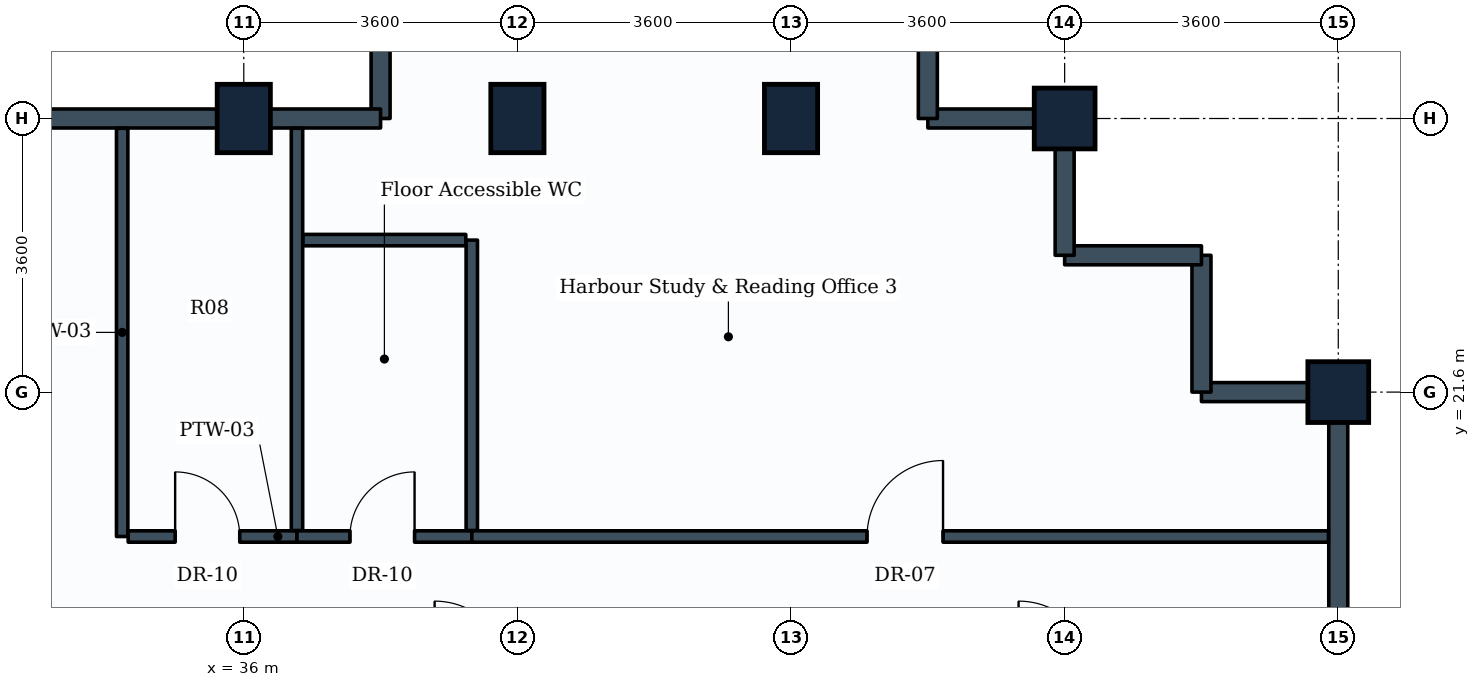
"""IFC4 building model, lengths in metres.
Left out: names, types, materials, properties, quantities, classifications, styles, units other than length and angle.
Written with IfcOpenShell. Run it as: python <this file> out.ifc"""

import sys

from ifc_helpers import new_model, si_unit, direction, frame, frame_2d, origin, origin_2d, place, context, subcontext, project, spatial, rectangle, extrude, element, fill, save


model = new_model("IFC4")
c1 = context("Model", 3, precision=1e-05, world=origin(), true_north=direction((0.0, 1.0)))
c2 = subcontext(c1, "Body", "Model", "MODEL_VIEW")
j1 = project(units=[si_unit("LENGTHUNIT", "METRE"), si_unit("PLANEANGLEUNIT", "RADIAN")], contexts=[c1])
p1 = place(None, origin())
s1 = spatial("IfcSite", under=j1, at=p1, CompositionType="ELEMENT")
p2 = place(p1, origin())
s2 = spatial("IfcBuilding", under=s1, at=p2, CompositionType="ELEMENT")
p3 = place(p2, frame((0.0, 0.0, 217.4)))
s3 = spatial("IfcBuildingStorey", under=s2, at=p3, CompositionType="ELEMENT", Elevation=217.4)
for number, where, z_axis, x_axis in (
    (1, (36.0, 25.2, 0.0), (0.0, 0.0, 1.0), (1.0, 0.0, 0.0)),
    (2, (39.6, 25.2, 0.0), (0.0, 0.0, 1.0), (1.0, 0.0, 0.0)),
    (3, (43.2, 25.2, 0.0), (0.0, 0.0, 1.0), (1.0, 0.0, 0.0)),
):
    element("IfcColumn", number, at=place(p3, frame(where, z_axis=z_axis, x_axis=x_axis)), inside=s3, PredefinedType="COLUMN", context=c2, shape_type="SweptSolid", body=[
        extrude(rectangle(XDim=0.7, YDim=0.9, at=origin_2d()), origin(), (0.0, 0.0, 1.0), 3.6),
    ])
for number, where, z_axis, x_axis in (
    (4, (46.8, 25.2, 0.0), (0.0, 0.0, 1.0), (1.0, 0.0, 0.0)),
    (5, (50.4, 21.6, 0.0), (0.0, 0.0, 1.0), (0.0, 1.0, 0.0)),
):
    element("IfcColumn", number, at=place(p3, frame(where, z_axis=z_axis, x_axis=x_axis)), inside=s3, PredefinedType="COLUMN", context=c2, shape_type="SweptSolid", body=[
        extrude(rectangle(XDim=0.8, YDim=0.8, at=origin_2d()), origin(), (0.0, 0.0, 1.0), 3.6),
    ])
p4 = place(p3, frame((50.4, 21.6, 0.0), z_axis=(0.0, 0.0, 1.0), x_axis=(0.0, -1.0, 0.0)))
e6 = element("IfcWall", 6, at=p4, inside=s3, PredefinedType="STANDARD", context=c2, shape_type="SweptSolid", body=[
    extrude(rectangle(XDim=3.6, YDim=0.25, at=frame_2d((1.8, 0.0))), origin(), (0.0, 0.0, 1.0), 2.23),
])
p5 = place(p3, frame((48.6, 21.6, 0.0), z_axis=(0.0, 0.0, 1.0), x_axis=(1.0, 0.0, 0.0)))
e7 = element("IfcWall", 7, at=p5, inside=s3, PredefinedType="STANDARD", context=c2, shape_type="SweptSolid", body=[
    extrude(rectangle(XDim=1.8, YDim=0.25, at=frame_2d((0.9, 0.0))), origin(), (0.0, 0.0, 1.0), 2.23),
])
p6 = place(p3, frame((48.6, 23.4, 0.0), z_axis=(0.0, 0.0, 1.0), x_axis=(0.0, -1.0, 0.0)))
e8 = element("IfcWall", 8, at=p6, inside=s3, PredefinedType="STANDARD", context=c2, shape_type="SweptSolid", body=[
    extrude(rectangle(XDim=1.8, YDim=0.25, at=frame_2d((0.9, 0.0))), origin(), (0.0, 0.0, 1.0), 3.265),
])
for number, where, z_axis, x_axis in (
    (9, (46.8, 23.4, 0.0), (0.0, 0.0, 1.0), (1.0, 0.0, 0.0)),
    (10, (46.8, 25.2, 0.0), (0.0, 0.0, 1.0), (0.0, -1.0, 0.0)),
    (11, (45.0, 25.2, 0.0), (0.0, 0.0, 1.0), (1.0, 0.0, 0.0)),
):
    element("IfcWall", number, at=place(p3, frame(where, z_axis=z_axis, x_axis=x_axis)), inside=s3, PredefinedType="STANDARD", context=c2, shape_type="SweptSolid", body=[
        extrude(rectangle(XDim=1.8, YDim=0.25, at=frame_2d((0.9, 0.0))), origin(), (0.0, 0.0, 1.0), 3.265),
    ])
p7 = place(p3, frame((45.0, 27.3, 0.0), z_axis=(0.0, 0.0, 1.0), x_axis=(0.0, -1.0, 0.0)))
e12 = element("IfcWall", 12, at=p7, inside=s3, PredefinedType="STANDARD", context=c2, shape_type="SweptSolid", body=[
    extrude(rectangle(XDim=2.1, YDim=0.25, at=frame_2d((1.05, 0.0))), origin(), (0.0, 0.0, 1.0), 3.265),
])
p8 = place(p3, frame((37.8, 27.3, 0.0), z_axis=(0.0, 0.0, 1.0), x_axis=(0.0, -1.0, 0.0)))
e13 = element("IfcWall", 13, at=p8, inside=s3, PredefinedType="STANDARD", context=c2, shape_type="SweptSolid", body=[
    extrude(rectangle(XDim=2.1, YDim=0.25, at=frame_2d((1.05, 0.0))), origin(), (0.0, 0.0, 1.0), 2.83),
])
p9 = place(p3, frame((36.0, 25.2, 0.0), z_axis=(0.0, 0.0, 1.0), x_axis=(1.0, 0.0, 0.0)))
e14 = element("IfcWall", 14, at=p9, inside=s3, PredefinedType="STANDARD", context=c2, shape_type="SweptSolid", body=[
    extrude(rectangle(XDim=1.8, YDim=0.25, at=frame_2d((0.9, 0.0))), origin(), (0.0, 0.0, 1.0), 2.83),
])
p10 = place(p3, frame((32.4, 25.2, 0.0), z_axis=(0.0, 0.0, 1.0), x_axis=(1.0, 0.0, 0.0)))
e15 = element("IfcWall", 15, at=p10, inside=s3, PredefinedType="STANDARD", context=c2, shape_type="SweptSolid", body=[
    extrude(rectangle(XDim=3.6, YDim=0.25, at=frame_2d((1.8, 0.0))), origin(), (0.0, 0.0, 1.0), 2.83),
])
p11 = place(p3, frame((34.4, 19.7, 0.0), z_axis=(0.0, 0.0, 1.0), x_axis=(0.0, 1.0, 0.0)))
e16 = element("IfcWall", 16, at=p11, inside=s3, PredefinedType="PARTITIONING", context=c2, shape_type="SweptSolid", body=[
    extrude(rectangle(XDim=5.371, YDim=0.15, at=frame_2d((2.686, 0.0))), origin(), (0.0, 0.0, 1.0), 2.83),
])
p12 = place(p3, frame((34.479, 19.7, 0.0), z_axis=(0.0, 0.0, 1.0), x_axis=(1.0, 0.0, 0.0)))
e17 = element("IfcWall", 17, at=p12, inside=s3, PredefinedType="PARTITIONING", context=c2, shape_type="SweptSolid", body=[
    extrude(rectangle(XDim=2.221, YDim=0.15, at=frame_2d((1.11, 0.0))), origin(), (0.0, 0.0, 1.0), 2.96),
])
p13 = place(p12, frame((0.618, 0.0, 0.0)))
e18 = element("IfcOpeningElement", 18, at=p13, cuts=e17, PredefinedType="OPENING", context=c2, shape_type="SweptSolid", body=[
    extrude(rectangle(XDim=0.85, YDim=2.1, at=frame_2d((0.425, 1.05))), frame((0.0, 0.085, 0.0), z_axis=(0.0, -1.0, 0.0), x_axis=(1.0, 0.0, 0.0)), (0.0, 0.0, 1.0), 0.17),
])
p14 = place(p3, frame((36.7, 19.779, 0.0), z_axis=(0.0, 0.0, 1.0), x_axis=(0.0, 1.0, 0.0)))
e19 = element("IfcWall", 19, at=p14, inside=s3, PredefinedType="PARTITIONING", context=c2, shape_type="SweptSolid", body=[
    extrude(rectangle(XDim=5.292, YDim=0.15, at=frame_2d((2.646, 0.0))), origin(), (0.0, 0.0, 1.0), 2.83),
])
p15 = place(p3, frame((36.7, 19.7, 0.0), z_axis=(0.0, 0.0, 1.0), x_axis=(1.0, 0.0, 0.0)))
e20 = element("IfcWall", 20, at=p15, inside=s3, PredefinedType="PARTITIONING", context=c2, shape_type="SweptSolid", body=[
    extrude(rectangle(XDim=2.3, YDim=0.15, at=frame_2d((1.15, 0.0))), origin(), (0.0, 0.0, 1.0), 3.265),
])
p16 = place(p15, frame((0.697, 0.0, 0.0)))
e21 = element("IfcOpeningElement", 21, at=p16, cuts=e20, PredefinedType="OPENING", context=c2, shape_type="SweptSolid", body=[
    extrude(rectangle(XDim=0.85, YDim=2.1, at=frame_2d((0.425, 1.05))), frame((0.0, 0.085, 0.0), z_axis=(0.0, -1.0, 0.0), x_axis=(1.0, 0.0, 0.0)), (0.0, 0.0, 1.0), 0.17),
])
p17 = place(p3, frame((39.0, 19.779, 0.0), z_axis=(0.0, 0.0, 1.0), x_axis=(0.0, 1.0, 0.0)))
e22 = element("IfcWall", 22, at=p17, inside=s3, PredefinedType="PARTITIONING", context=c2, shape_type="SweptSolid", body=[
    extrude(rectangle(XDim=3.821, YDim=0.15, at=frame_2d((1.911, 0.0))), origin(), (0.0, 0.0, 1.0), 3.265),
])
p18 = place(p3, frame((36.779, 23.6, 0.0), z_axis=(0.0, 0.0, 1.0), x_axis=(1.0, 0.0, 0.0)))
e23 = element("IfcWall", 23, at=p18, inside=s3, PredefinedType="PARTITIONING", context=c2, shape_type="SweptSolid", body=[
    extrude(rectangle(XDim=2.142, YDim=0.15, at=frame_2d((1.071, 0.0))), origin(), (0.0, 0.0, 1.0), 3.265),
])
p19 = place(p3, frame((39.0, 19.7, 0.0), z_axis=(0.0, 0.0, 1.0), x_axis=(1.0, 0.0, 0.0)))
e24 = element("IfcWall", 24, at=p19, inside=s3, PredefinedType="PARTITIONING", context=c2, shape_type="SweptSolid", body=[
    extrude(rectangle(XDim=11.271, YDim=0.15, at=frame_2d((5.635, 0.0))), origin(), (0.0, 0.0, 1.0), 2.23),
])
p20 = place(p19, frame((5.2, 0.0, 0.0)))
e25 = element("IfcOpeningElement", 25, at=p20, cuts=e24, PredefinedType="OPENING", context=c2, shape_type="SweptSolid", body=[
    extrude(rectangle(XDim=1.0, YDim=2.1, at=frame_2d((0.5, 1.05))), frame((0.0, 0.085, 0.0), z_axis=(0.0, -1.0, 0.0), x_axis=(1.0, 0.0, 0.0)), (0.0, 0.0, 1.0), 0.17),
])
p21 = place(p13, origin())
e26 = element("IfcDoor", 26, at=p21, inside=s3, OperationType="SINGLE_SWING_LEFT", PredefinedType="DOOR", context=c2, shape_type="SweptSolid", body=[
    extrude(rectangle(XDim=0.85, YDim=2.1, at=frame_2d((0.425, 1.05))), frame((0.0, 0.025, 0.0), z_axis=(0.0, -1.0, 0.0), x_axis=(1.0, 0.0, 0.0)), (0.0, 0.0, 1.0), 0.05),
])
fill(e18, e26)
p22 = place(p16, origin())
e27 = element("IfcDoor", 27, at=p22, inside=s3, OperationType="SINGLE_SWING_RIGHT", PredefinedType="DOOR", context=c2, shape_type="SweptSolid", body=[
    extrude(rectangle(XDim=0.85, YDim=2.1, at=frame_2d((0.425, 1.05))), frame((0.0, 0.025, 0.0), z_axis=(0.0, -1.0, 0.0), x_axis=(1.0, 0.0, 0.0)), (0.0, 0.0, 1.0), 0.05),
])
fill(e21, e27)
p23 = place(p20, origin())
e28 = element("IfcDoor", 28, at=p23, inside=s3, OperationType="SINGLE_SWING_RIGHT", PredefinedType="DOOR", context=c2, shape_type="SweptSolid", body=[
    extrude(rectangle(XDim=1.0, YDim=2.1, at=frame_2d((0.5, 1.05))), frame((0.0, 0.025, 0.0), z_axis=(0.0, -1.0, 0.0), x_axis=(1.0, 0.0, 0.0)), (0.0, 0.0, 1.0), 0.05),
])
fill(e25, e28)
save(model, sys.argv[1])
